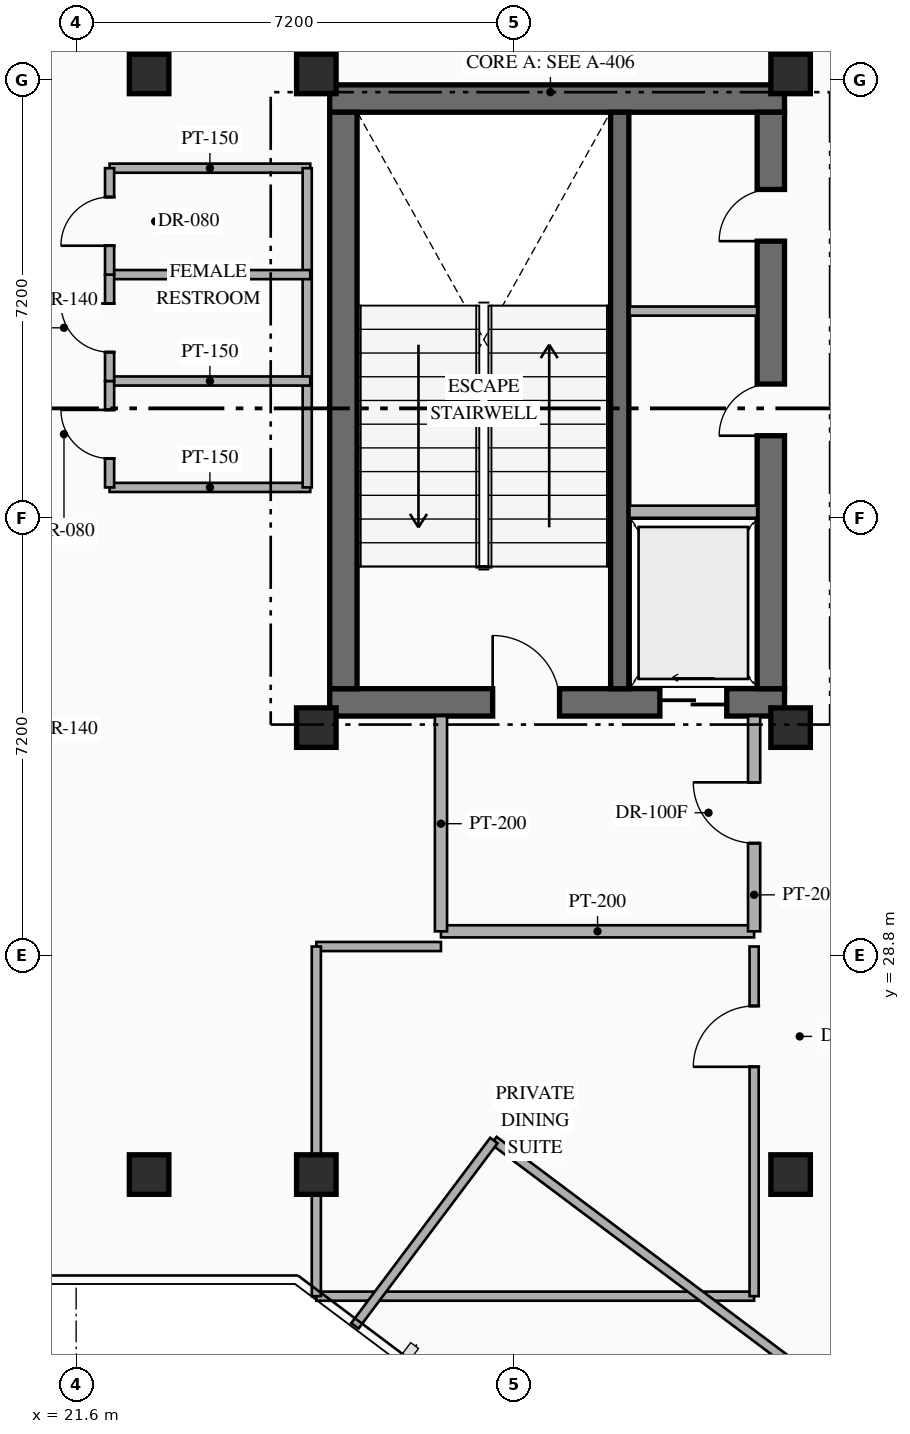
"""IFC4 building model, lengths in metres.
Left out: names, types, materials, properties, quantities, classifications, styles, units other than length and angle.
Written with IfcOpenShell. Run it as: python <this file> out.ifc"""

import sys

from ifc_helpers import new_model, si_unit, direction, frame, frame_2d, origin, origin_2d, place, context, subcontext, project, spatial, rectangle, hollow_rectangle, extrude, element, fill, save


model = new_model("IFC4")
c1 = context("Model", 3, precision=1e-05, world=origin(), true_north=direction((0.0, 1.0)))
c2 = subcontext(c1, "Body", "Model", "MODEL_VIEW")
j1 = project(units=[si_unit("LENGTHUNIT", "METRE"), si_unit("PLANEANGLEUNIT", "RADIAN")], contexts=[c1])
p1 = place(None, origin())
s1 = spatial("IfcSite", under=j1, at=p1, CompositionType="ELEMENT")
p2 = place(p1, origin())
s2 = spatial("IfcBuilding", under=s1, at=p2, CompositionType="ELEMENT")
p3 = place(p2, frame((0.0, 0.0, 257.55)))
s3 = spatial("IfcBuildingStorey", under=s2, at=p3, CompositionType="ELEMENT", Elevation=257.55)
p4 = place(p3, frame((25.77, 32.965, 0.0), z_axis=(0.0, 0.0, 1.0), x_axis=(1.0, 0.0, 0.0)))
e1 = element("IfcWall", 1, at=p4, inside=s3, PredefinedType="SHEAR", context=c2, shape_type="SweptSolid", body=[
    extrude(rectangle(XDim=7.48, YDim=0.45, at=frame_2d((3.74, 0.0))), origin(), (0.0, 0.0, 1.0), 4.2),
])
p5 = place(p4, frame((2.68, 0.0, 0.0)))
e2 = element("IfcOpeningElement", 2, at=p5, cuts=e1, PredefinedType="OPENING", context=c2, shape_type="SweptSolid", body=[
    extrude(rectangle(XDim=1.1, YDim=2.2, at=frame_2d((0.55, 1.1))), frame((0.0, 0.235, 0.0), z_axis=(0.0, -1.0, 0.0), x_axis=(1.0, 0.0, 0.0)), (0.0, 0.0, 1.0), 0.47),
])
p6 = place(p4, frame((5.43, 0.0, 0.0)))
e3 = element("IfcOpeningElement", 3, at=p6, cuts=e1, PredefinedType="OPENING", context=c2, shape_type="SweptSolid", body=[
    extrude(rectangle(XDim=1.1, YDim=2.15, at=frame_2d((0.55, 1.075))), frame((0.0, 0.235, 0.0), z_axis=(0.0, -1.0, 0.0), x_axis=(1.0, 0.0, 0.0)), (0.0, 0.0, 1.0), 0.47),
])
p7 = place(p3, frame((25.77, 42.895, 0.0), z_axis=(0.0, 0.0, 1.0), x_axis=(1.0, 0.0, 0.0)))
e4 = element("IfcWall", 4, at=p7, inside=s3, PredefinedType="SHEAR", context=c2, shape_type="SweptSolid", body=[
    extrude(rectangle(XDim=7.48, YDim=0.45, at=frame_2d((3.74, 0.0))), origin(), (0.0, 0.0, 1.0), 4.2),
])
p8 = place(p3, frame((25.995, 33.19, 0.0), z_axis=(0.0, 0.0, 1.0), x_axis=(0.0, 1.0, 0.0)))
e5 = element("IfcWall", 5, at=p8, inside=s3, PredefinedType="SHEAR", context=c2, shape_type="SweptSolid", body=[
    extrude(rectangle(XDim=9.48, YDim=0.45, at=frame_2d((4.74, 0.0))), origin(), (0.0, 0.0, 1.0), 4.2),
])
p9 = place(p3, frame((33.025, 33.19, 0.0), z_axis=(0.0, 0.0, 1.0), x_axis=(0.0, 1.0, 0.0)))
e6 = element("IfcWall", 6, at=p9, inside=s3, PredefinedType="SHEAR", context=c2, shape_type="SweptSolid", body=[
    extrude(rectangle(XDim=9.48, YDim=0.45, at=frame_2d((4.74, 0.0))), origin(), (0.0, 0.0, 1.0), 4.2),
])
p10 = place(p9, frame((4.16, 0.0, 0.0)))
e7 = element("IfcOpeningElement", 7, at=p10, cuts=e6, PredefinedType="OPENING", context=c2, shape_type="SweptSolid", body=[
    extrude(rectangle(XDim=0.85, YDim=2.08, at=frame_2d((0.425, 1.04))), frame((0.0, 0.235, 0.0), z_axis=(0.0, -1.0, 0.0), x_axis=(1.0, 0.0, 0.0)), (0.0, 0.0, 1.0), 0.47),
])
p11 = place(p9, frame((7.36, 0.0, 0.0)))
e8 = element("IfcOpeningElement", 8, at=p11, cuts=e6, PredefinedType="OPENING", context=c2, shape_type="SweptSolid", body=[
    extrude(rectangle(XDim=0.85, YDim=2.08, at=frame_2d((0.425, 1.04))), frame((0.0, 0.235, 0.0), z_axis=(0.0, -1.0, 0.0), x_axis=(1.0, 0.0, 0.0)), (0.0, 0.0, 1.0), 0.47),
])
p12 = place(p3, frame((30.54, 33.19, 0.0), z_axis=(0.0, 0.0, 1.0), x_axis=(0.0, 1.0, 0.0)))
e9 = element("IfcWall", 9, at=p12, inside=s3, PredefinedType="SHEAR", context=c2, shape_type="SweptSolid", body=[
    extrude(rectangle(XDim=9.48, YDim=0.3, at=frame_2d((4.74, 0.0))), origin(), (0.0, 0.0, 1.0), 4.2),
])
for number, where, z_axis, x_axis in (
    (10, (25.55, 32.55, 0.0), (0.0, 0.0, 1.0), (1.0, 0.0, 0.0)),
    (11, (33.35, 32.55, 0.0), (0.0, 0.0, 1.0), (1.0, 0.0, 0.0)),
    (12, (25.55, 43.3, 0.0), (0.0, 0.0, 1.0), (1.0, 0.0, 0.0)),
    (13, (33.35, 43.3, 0.0), (0.0, 0.0, 1.0), (1.0, 0.0, 0.0)),
    (14, (25.55, 25.2, 0.0), (0.0, 0.0, 1.0), (1.0, 0.0, 0.0)),
    (15, (33.35, 25.2, 0.0), (0.0, 0.0, 1.0), (1.0, 0.0, 0.0)),
    (16, (22.8, 25.2, 0.0), (0.0, 0.0, 1.0), (1.0, 0.0, 0.0)),
    (17, (22.8, 43.3, 0.0), (0.0, 0.0, 1.0), (1.0, 0.0, 0.0)),
):
    element("IfcColumn", number, at=place(p3, frame(where, z_axis=z_axis, x_axis=x_axis)), inside=s3, PredefinedType="COLUMN", context=c2, shape_type="SweptSolid", body=[
        extrude(hollow_rectangle(XDim=0.65, YDim=0.65, WallThickness=0.025, at=origin_2d()), origin(), (0.0, 0.0, 1.0), 4.2),
    ])
p13 = place(p3, frame((30.7, 36.1, 0.0), z_axis=(0.0, 0.0, 1.0), x_axis=(1.0, 0.0, 0.0)))
e18 = element("IfcWall", 18, at=p13, inside=s3, PredefinedType="STANDARD", context=c2, shape_type="SweptSolid", body=[
    extrude(rectangle(XDim=2.1, YDim=0.2, at=frame_2d((1.05, 0.0))), origin(), (0.0, 0.0, 1.0), 3.95),
])
p14 = place(p3, frame((30.7, 39.4, 0.0), z_axis=(0.0, 0.0, 1.0), x_axis=(1.0, 0.0, 0.0)))
e19 = element("IfcWall", 19, at=p14, inside=s3, PredefinedType="PARTITIONING", context=c2, shape_type="SweptSolid", body=[
    extrude(rectangle(XDim=2.1, YDim=0.15, at=frame_2d((1.05, 0.0))), origin(), (0.0, 0.0, 1.0), 3.95),
])
p15 = place(p3, frame((27.6, 29.2, 0.0), z_axis=(0.0, 0.0, 1.0), x_axis=(1.0, 0.0, 0.0)))
e20 = element("IfcWall", 20, at=p15, inside=s3, PredefinedType="STANDARD", context=c2, shape_type="SweptSolid", body=[
    extrude(rectangle(XDim=5.15, YDim=0.2, at=frame_2d((2.575, 0.0))), origin(), (0.0, 0.0, 1.0), 3.95),
])
p16 = place(p3, frame((27.6, 29.2, 0.0), z_axis=(0.0, 0.0, 1.0), x_axis=(0.0, 1.0, 0.0)))
e21 = element("IfcWall", 21, at=p16, inside=s3, PredefinedType="STANDARD", context=c2, shape_type="SweptSolid", body=[
    extrude(rectangle(XDim=3.54, YDim=0.2, at=frame_2d((1.77, 0.0))), origin(), (0.0, 0.0, 1.0), 3.95),
])
p17 = place(p3, frame((32.75, 29.2, 0.0), z_axis=(0.0, 0.0, 1.0), x_axis=(0.0, 1.0, 0.0)))
e22 = element("IfcWall", 22, at=p17, inside=s3, PredefinedType="STANDARD", context=c2, shape_type="SweptSolid", body=[
    extrude(rectangle(XDim=3.54, YDim=0.2, at=frame_2d((1.77, 0.0))), origin(), (0.0, 0.0, 1.0), 3.95),
])
p18 = place(p17, frame((1.45, 0.0, 0.0)))
e23 = element("IfcOpeningElement", 23, at=p18, cuts=e22, PredefinedType="OPENING", context=c2, shape_type="SweptSolid", body=[
    extrude(rectangle(XDim=1.0, YDim=2.2, at=frame_2d((0.5, 1.1))), frame((0.0, 0.11, 0.0), z_axis=(0.0, -1.0, 0.0), x_axis=(1.0, 0.0, 0.0)), (0.0, 0.0, 1.0), 0.22),
])
for number, where, z_axis, x_axis in (
    (24, (22.15, 36.5, 0.0), (0.0, 0.0, 1.0), (1.0, 0.0, 0.0)),
    (25, (22.15, 41.75, 0.0), (0.0, 0.0, 1.0), (1.0, 0.0, 0.0)),
):
    element("IfcWall", number, at=place(p3, frame(where, z_axis=z_axis, x_axis=x_axis)), inside=s3, PredefinedType="PARTITIONING", context=c2, shape_type="SweptSolid", body=[
        extrude(rectangle(XDim=3.3, YDim=0.15, at=frame_2d((1.65, 0.0))), origin(), (0.0, 0.0, 1.0), 3.95),
    ])
p19 = place(p3, frame((25.4, 36.5, 0.0), z_axis=(0.0, 0.0, 1.0), x_axis=(0.0, 1.0, 0.0)))
e26 = element("IfcWall", 26, at=p19, inside=s3, PredefinedType="PARTITIONING", context=c2, shape_type="SweptSolid", body=[
    extrude(rectangle(XDim=5.25, YDim=0.15, at=frame_2d((2.625, 0.0))), origin(), (0.0, 0.0, 1.0), 3.95),
])
for number, where, z_axis, x_axis in (
    (27, (22.15, 38.25, 0.0), (0.0, 0.0, 1.0), (1.0, 0.0, 0.0)),
    (28, (22.15, 40.0, 0.0), (0.0, 0.0, 1.0), (1.0, 0.0, 0.0)),
):
    element("IfcWall", number, at=place(p3, frame(where, z_axis=z_axis, x_axis=x_axis)), inside=s3, PredefinedType="PARTITIONING", context=c2, shape_type="SweptSolid", body=[
        extrude(rectangle(XDim=3.3, YDim=0.15, at=frame_2d((1.65, 0.0))), origin(), (0.0, 0.0, 1.0), 3.95),
    ])
p20 = place(p3, frame((22.15, 36.5, 0.0), z_axis=(0.0, 0.0, 1.0), x_axis=(0.0, 1.0, 0.0)))
e29 = element("IfcWall", 29, at=p20, inside=s3, PredefinedType="PARTITIONING", context=c2, shape_type="SweptSolid", body=[
    extrude(rectangle(XDim=1.75, YDim=0.15, at=frame_2d((0.875, 0.0))), origin(), (0.0, 0.0, 1.0), 3.95),
])
p21 = place(p20, frame((0.475, 0.0, 0.0)))
e30 = element("IfcOpeningElement", 30, at=p21, cuts=e29, PredefinedType="OPENING", context=c2, shape_type="SweptSolid", body=[
    extrude(rectangle(XDim=0.8, YDim=2.06, at=frame_2d((0.4, 1.03))), frame((0.0, 0.085, 0.0), z_axis=(0.0, -1.0, 0.0), x_axis=(1.0, 0.0, 0.0)), (0.0, 0.0, 1.0), 0.17),
])
p22 = place(p3, frame((22.15, 38.25, 0.0), z_axis=(0.0, 0.0, 1.0), x_axis=(0.0, 1.0, 0.0)))
e31 = element("IfcWall", 31, at=p22, inside=s3, PredefinedType="PARTITIONING", context=c2, shape_type="SweptSolid", body=[
    extrude(rectangle(XDim=1.75, YDim=0.15, at=frame_2d((0.875, 0.0))), origin(), (0.0, 0.0, 1.0), 3.95),
])
p23 = place(p22, frame((0.475, 0.0, 0.0)))
e32 = element("IfcOpeningElement", 32, at=p23, cuts=e31, PredefinedType="OPENING", context=c2, shape_type="SweptSolid", body=[
    extrude(rectangle(XDim=0.8, YDim=2.06, at=frame_2d((0.4, 1.03))), frame((0.0, 0.085, 0.0), z_axis=(0.0, -1.0, 0.0), x_axis=(1.0, 0.0, 0.0)), (0.0, 0.0, 1.0), 0.17),
])
p24 = place(p3, frame((22.15, 40.0, 0.0), z_axis=(0.0, 0.0, 1.0), x_axis=(0.0, 1.0, 0.0)))
e33 = element("IfcWall", 33, at=p24, inside=s3, PredefinedType="PARTITIONING", context=c2, shape_type="SweptSolid", body=[
    extrude(rectangle(XDim=1.75, YDim=0.15, at=frame_2d((0.875, 0.0))), origin(), (0.0, 0.0, 1.0), 3.95),
])
p25 = place(p24, frame((0.475, 0.0, 0.0)))
e34 = element("IfcOpeningElement", 34, at=p25, cuts=e33, PredefinedType="OPENING", context=c2, shape_type="SweptSolid", body=[
    extrude(rectangle(XDim=0.8, YDim=2.06, at=frame_2d((0.4, 1.03))), frame((0.0, 0.085, 0.0), z_axis=(0.0, -1.0, 0.0), x_axis=(1.0, 0.0, 0.0)), (0.0, 0.0, 1.0), 0.17),
])
p26 = place(p3, frame((25.55, 23.2, 0.0), z_axis=(0.0, 0.0, 1.0), x_axis=(1.0, 0.0, 0.0)))
e35 = element("IfcWall", 35, at=p26, inside=s3, PredefinedType="PARTITIONING", context=c2, shape_type="SweptSolid", body=[
    extrude(rectangle(XDim=7.2, YDim=0.15, at=frame_2d((3.6, 0.0))), origin(), (0.0, 0.0, 1.0), 3.95),
])
p27 = place(p3, frame((25.55, 28.95, 0.0), z_axis=(0.0, 0.0, 1.0), x_axis=(1.0, 0.0, 0.0)))
e36 = element("IfcWall", 36, at=p27, inside=s3, PredefinedType="PARTITIONING", context=c2, shape_type="SweptSolid", body=[
    extrude(rectangle(XDim=2.05, YDim=0.15, at=frame_2d((1.025, 0.0))), origin(), (0.0, 0.0, 1.0), 3.95),
])
p28 = place(p3, frame((25.55, 23.2, 0.0), z_axis=(0.0, 0.0, 1.0), x_axis=(0.0, 1.0, 0.0)))
e37 = element("IfcWall", 37, at=p28, inside=s3, PredefinedType="PARTITIONING", context=c2, shape_type="SweptSolid", body=[
    extrude(rectangle(XDim=5.75, YDim=0.15, at=frame_2d((2.875, 0.0))), origin(), (0.0, 0.0, 1.0), 2.445),
])
p29 = place(p3, frame((32.75, 23.2, 0.0), z_axis=(0.0, 0.0, 1.0), x_axis=(0.0, 1.0, 0.0)))
e38 = element("IfcWall", 38, at=p29, inside=s3, PredefinedType="PARTITIONING", context=c2, shape_type="SweptSolid", body=[
    extrude(rectangle(XDim=5.75, YDim=0.15, at=frame_2d((2.875, 0.0))), origin(), (0.0, 0.0, 1.0), 3.95),
])
p30 = place(p29, frame((3.772, 0.0, 0.0)))
e39 = element("IfcOpeningElement", 39, at=p30, cuts=e38, PredefinedType="OPENING", context=c2, shape_type="SweptSolid", body=[
    extrude(rectangle(XDim=1.0, YDim=2.15, at=frame_2d((0.5, 1.075))), frame((0.0, 0.085, 0.0), z_axis=(0.0, -1.0, 0.0), x_axis=(1.0, 0.0, 0.0)), (0.0, 0.0, 1.0), 0.17),
])
p31 = place(p3, frame((28.47, 25.76, 0.0), z_axis=(0.0, 0.0, 1.0), x_axis=(0.800001748029, -0.599997669287, 0.0)))
e40 = element("IfcWall", 40, at=p31, inside=s3, PredefinedType="PARTITIONING", context=c2, shape_type="SweptSolid", body=[
    extrude(rectangle(XDim=16.76, YDim=0.15, at=frame_2d((8.38, 0.0))), origin(), (0.0, 0.0, 1.0), 3.95),
])
p32 = place(p31, frame((7.905, 0.0, 0.0)))
e41 = element("IfcOpeningElement", 41, at=p32, cuts=e40, PredefinedType="OPENING", context=c2, shape_type="SweptSolid", body=[
    extrude(rectangle(XDim=0.95, YDim=2.15, at=frame_2d((0.475, 1.075))), frame((0.0, 0.085, 0.0), z_axis=(0.0, -1.0, 0.0), x_axis=(1.0, 0.0, 0.0)), (0.0, 0.0, 1.0), 0.17),
])
p33 = place(p3, frame((26.184, 22.712, 0.0), z_axis=(0.0, 0.0, 1.0), x_axis=(0.599969241761, 0.800023067755, 0.0)))
e42 = element("IfcWall", 42, at=p33, inside=s3, PredefinedType="PARTITIONING", context=c2, shape_type="SweptSolid", body=[
    extrude(rectangle(XDim=3.81, YDim=0.15, at=frame_2d((1.905, 0.0))), origin(), (0.0, 0.0, 1.0), 3.95),
])
p34 = place(p5, origin())
e43 = element("IfcDoor", 43, at=p34, inside=s3, OperationType="SINGLE_SWING_LEFT", PredefinedType="DOOR", context=c2, shape_type="SweptSolid", body=[
    extrude(rectangle(XDim=1.1, YDim=2.2, at=frame_2d((0.55, 1.1))), frame((0.0, 0.025, 0.0), z_axis=(0.0, -1.0, 0.0), x_axis=(1.0, 0.0, 0.0)), (0.0, 0.0, 1.0), 0.05),
])
fill(e2, e43)
p35 = place(p6, origin())
e44 = element("IfcDoor", 44, at=p35, inside=s3, OperationType="SLIDING_TO_LEFT", PredefinedType="USERDEFINED", context=c2, shape_type="SweptSolid", body=[
    extrude(rectangle(XDim=1.1, YDim=2.15, at=frame_2d((0.55, 1.075))), frame((0.0, 0.025, 0.0), z_axis=(0.0, -1.0, 0.0), x_axis=(1.0, 0.0, 0.0)), (0.0, 0.0, 1.0), 0.05),
])
fill(e3, e44)
p36 = place(p10, origin())
e45 = element("IfcDoor", 45, at=p36, inside=s3, OperationType="SINGLE_SWING_LEFT", PredefinedType="DOOR", context=c2, shape_type="SweptSolid", body=[
    extrude(rectangle(XDim=0.85, YDim=2.08, at=frame_2d((0.425, 1.04))), frame((0.0, 0.025, 0.0), z_axis=(0.0, -1.0, 0.0), x_axis=(1.0, 0.0, 0.0)), (0.0, 0.0, 1.0), 0.05),
])
fill(e7, e45)
p37 = place(p11, origin())
e46 = element("IfcDoor", 46, at=p37, inside=s3, OperationType="SINGLE_SWING_LEFT", PredefinedType="DOOR", context=c2, shape_type="SweptSolid", body=[
    extrude(rectangle(XDim=0.85, YDim=2.08, at=frame_2d((0.425, 1.04))), frame((0.0, 0.025, 0.0), z_axis=(0.0, -1.0, 0.0), x_axis=(1.0, 0.0, 0.0)), (0.0, 0.0, 1.0), 0.05),
])
fill(e8, e46)
p38 = place(p18, origin())
e47 = element("IfcDoor", 47, at=p38, inside=s3, OperationType="SINGLE_SWING_RIGHT", PredefinedType="DOOR", context=c2, shape_type="SweptSolid", body=[
    extrude(rectangle(XDim=1.0, YDim=2.2, at=frame_2d((0.5, 1.1))), frame((0.0, 0.025, 0.0), z_axis=(0.0, -1.0, 0.0), x_axis=(1.0, 0.0, 0.0)), (0.0, 0.0, 1.0), 0.05),
])
fill(e23, e47)
p39 = place(p21, origin())
e48 = element("IfcDoor", 48, at=p39, inside=s3, OperationType="SINGLE_SWING_RIGHT", PredefinedType="DOOR", context=c2, shape_type="SweptSolid", body=[
    extrude(rectangle(XDim=0.8, YDim=2.06, at=frame_2d((0.4, 1.03))), frame((0.0, 0.025, 0.0), z_axis=(0.0, -1.0, 0.0), x_axis=(1.0, 0.0, 0.0)), (0.0, 0.0, 1.0), 0.05),
])
fill(e30, e48)
p40 = place(p23, origin())
e49 = element("IfcDoor", 49, at=p40, inside=s3, OperationType="SINGLE_SWING_RIGHT", PredefinedType="DOOR", context=c2, shape_type="SweptSolid", body=[
    extrude(rectangle(XDim=0.8, YDim=2.06, at=frame_2d((0.4, 1.03))), frame((0.0, 0.025, 0.0), z_axis=(0.0, -1.0, 0.0), x_axis=(1.0, 0.0, 0.0)), (0.0, 0.0, 1.0), 0.05),
])
fill(e32, e49)
p41 = place(p25, origin())
e50 = element("IfcDoor", 50, at=p41, inside=s3, OperationType="SINGLE_SWING_LEFT", PredefinedType="DOOR", context=c2, shape_type="SweptSolid", body=[
    extrude(rectangle(XDim=0.8, YDim=2.06, at=frame_2d((0.4, 1.03))), frame((0.0, 0.025, 0.0), z_axis=(0.0, -1.0, 0.0), x_axis=(1.0, 0.0, 0.0)), (0.0, 0.0, 1.0), 0.05),
])
fill(e34, e50)
p42 = place(p30, origin())
e51 = element("IfcDoor", 51, at=p42, inside=s3, OperationType="SINGLE_SWING_LEFT", PredefinedType="DOOR", context=c2, shape_type="SweptSolid", body=[
    extrude(rectangle(XDim=1.0, YDim=2.15, at=frame_2d((0.5, 1.075))), frame((0.0, 0.025, 0.0), z_axis=(0.0, -1.0, 0.0), x_axis=(1.0, 0.0, 0.0)), (0.0, 0.0, 1.0), 0.05),
])
fill(e39, e51)
save(model, sys.argv[1])
